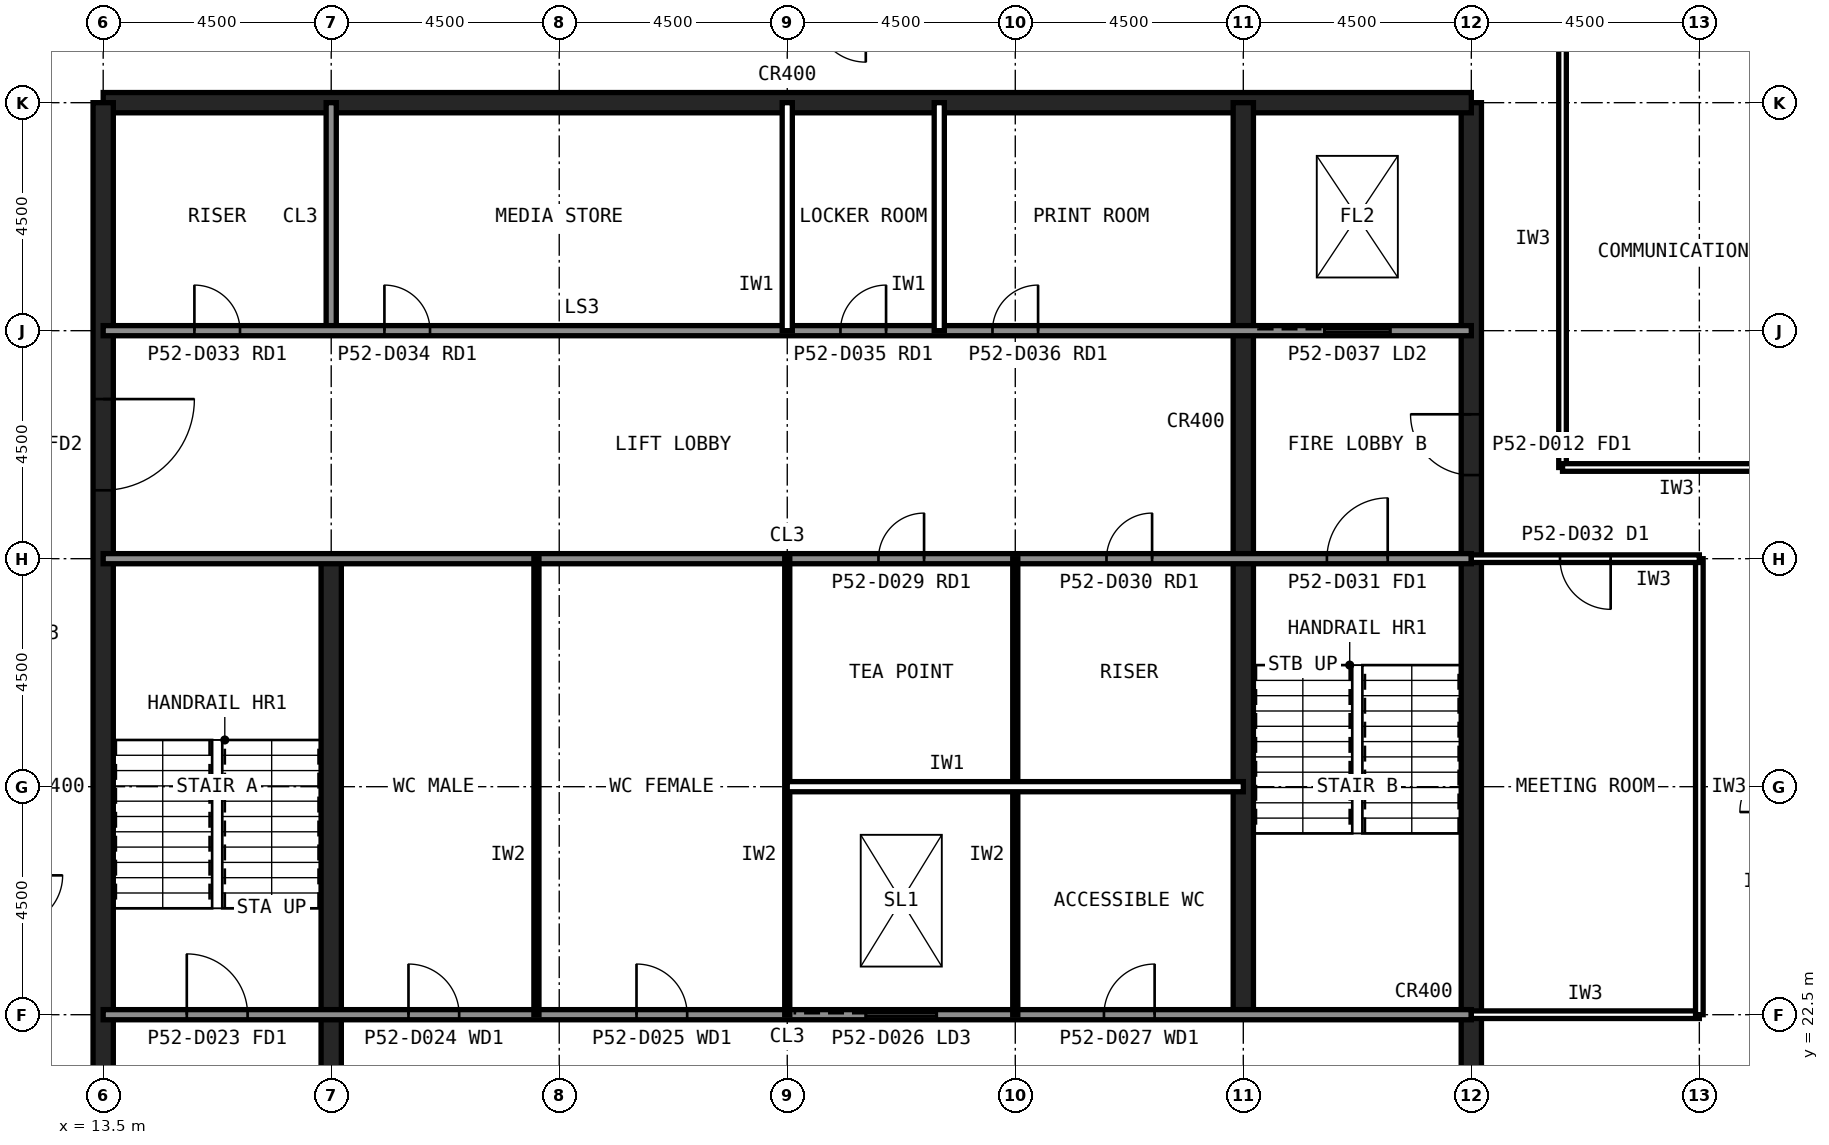
"""IFC4 building model, lengths in metres.
Left out: names, types, materials, properties, quantities, classifications, styles, units other than length and angle.
Written with IfcOpenShell. Run it as: python <this file> out.ifc"""

import sys

from ifc_helpers import new_model, si_unit, direction, frame, frame_2d, origin, place, context, subcontext, project, spatial, rectangle, extrude, element, fill, save


model = new_model("IFC4")
c1 = context("Model", 3, precision=1e-05, world=origin(), true_north=direction((0.0, 1.0)))
c2 = subcontext(c1, "Body", "Model", "MODEL_VIEW")
j1 = project(units=[si_unit("LENGTHUNIT", "METRE"), si_unit("PLANEANGLEUNIT", "RADIAN")], contexts=[c1])
p1 = place(None, origin())
s1 = spatial("IfcSite", under=j1, at=p1, CompositionType="ELEMENT")
p2 = place(p1, origin())
s2 = spatial("IfcBuilding", under=s1, at=p2, CompositionType="ELEMENT")
p3 = place(p2, frame((0.0, 0.0, 222.6)))
s3 = spatial("IfcBuildingStorey", under=s2, at=p3, CompositionType="ELEMENT", Elevation=222.6)
p4 = place(p3, frame((40.5, 13.5, 0.0), z_axis=(0.0, 0.0, 1.0), x_axis=(0.0, 1.0, 0.0)))
e1 = element("IfcWall", 1, at=p4, inside=s3, PredefinedType="SHEAR", context=c2, shape_type="SweptSolid", body=[
    extrude(rectangle(XDim=27.0, YDim=0.4, at=frame_2d((13.5, 0.0))), origin(), (0.0, 0.0, 1.0), 4.0),
])
p5 = place(p4, frame((5.85, 0.0, 0.0)))
e2 = element("IfcOpeningElement", 2, at=p5, cuts=e1, PredefinedType="OPENING", context=c2, shape_type="SweptSolid", body=[
    extrude(rectangle(XDim=1.8, YDim=2.1, at=frame_2d((0.9, 1.05))), frame((0.0, 0.21, 0.0), z_axis=(0.0, -1.0, 0.0), x_axis=(1.0, 0.0, 0.0)), (0.0, 0.0, 1.0), 0.42),
])
p6 = place(p4, frame((19.65, 0.0, 0.0)))
e3 = element("IfcOpeningElement", 3, at=p6, cuts=e1, PredefinedType="OPENING", context=c2, shape_type="SweptSolid", body=[
    extrude(rectangle(XDim=1.2, YDim=2.1, at=frame_2d((0.6, 1.05))), frame((0.0, 0.21, 0.0), z_axis=(0.0, -1.0, 0.0), x_axis=(1.0, 0.0, 0.0)), (0.0, 0.0, 1.0), 0.42),
])
p7 = place(p3, frame((40.5, 40.5, 0.0), z_axis=(0.0, 0.0, 1.0), x_axis=(-1.0, 0.0, 0.0)))
e4 = element("IfcWall", 4, at=p7, inside=s3, PredefinedType="SHEAR", context=c2, shape_type="SweptSolid", body=[
    extrude(rectangle(XDim=27.0, YDim=0.4, at=frame_2d((13.5, 0.0))), origin(), (0.0, 0.0, 1.0), 4.0),
])
p8 = place(p3, frame((13.5, 40.5, 0.0), z_axis=(0.0, 0.0, 1.0), x_axis=(0.0, -1.0, 0.0)))
e5 = element("IfcWall", 5, at=p8, inside=s3, PredefinedType="SHEAR", context=c2, shape_type="SweptSolid", body=[
    extrude(rectangle(XDim=27.0, YDim=0.4, at=frame_2d((13.5, 0.0))), origin(), (0.0, 0.0, 1.0), 4.0),
])
p9 = place(p8, frame((19.65, 0.0, 0.0)))
e6 = element("IfcOpeningElement", 6, at=p9, cuts=e5, PredefinedType="OPENING", context=c2, shape_type="SweptSolid", body=[
    extrude(rectangle(XDim=1.2, YDim=2.1, at=frame_2d((0.6, 1.05))), frame((0.0, 0.21, 0.0), z_axis=(0.0, -1.0, 0.0), x_axis=(1.0, 0.0, 0.0)), (0.0, 0.0, 1.0), 0.42),
])
p10 = place(p8, frame((5.85, 0.0, 0.0)))
e7 = element("IfcOpeningElement", 7, at=p10, cuts=e5, PredefinedType="OPENING", context=c2, shape_type="SweptSolid", body=[
    extrude(rectangle(XDim=1.8, YDim=2.1, at=frame_2d((0.9, 1.05))), frame((0.0, 0.21, 0.0), z_axis=(0.0, -1.0, 0.0), x_axis=(1.0, 0.0, 0.0)), (0.0, 0.0, 1.0), 0.42),
])
p11 = place(p3, frame((18.0, 13.5, 0.0), z_axis=(0.0, 0.0, 1.0), x_axis=(0.0, 1.0, 0.0)))
e8 = element("IfcWall", 8, at=p11, inside=s3, PredefinedType="SHEAR", context=c2, shape_type="SweptSolid", body=[
    extrude(rectangle(XDim=18.0, YDim=0.4, at=frame_2d((9.0, 0.0))), origin(), (0.0, 0.0, 1.0), 4.0),
])
p12 = place(p3, frame((18.0, 36.0, 0.0), z_axis=(0.0, 0.0, 1.0), x_axis=(0.0, 1.0, 0.0)))
e9 = element("IfcWall", 9, at=p12, inside=s3, PredefinedType="SOLIDWALL", context=c2, shape_type="SweptSolid", body=[
    extrude(rectangle(XDim=4.5, YDim=0.2, at=frame_2d((2.25, 0.0))), origin(), (0.0, 0.0, 1.0), 3.84),
])
p13 = place(p3, frame((36.0, 22.5, 0.0), z_axis=(0.0, 0.0, 1.0), x_axis=(0.0, 1.0, 0.0)))
e10 = element("IfcWall", 10, at=p13, inside=s3, PredefinedType="SHEAR", context=c2, shape_type="SweptSolid", body=[
    extrude(rectangle(XDim=18.0, YDim=0.4, at=frame_2d((9.0, 0.0))), origin(), (0.0, 0.0, 1.0), 4.0),
])
p14 = place(p3, frame((13.5, 36.0, 0.0), z_axis=(0.0, 0.0, 1.0), x_axis=(1.0, 0.0, 0.0)))
e11 = element("IfcWall", 11, at=p14, inside=s3, PredefinedType="SOLIDWALL", context=c2, shape_type="SweptSolid", body=[
    extrude(rectangle(XDim=27.0, YDim=0.2, at=frame_2d((13.5, 0.0))), origin(), (0.0, 0.0, 1.0), 3.84),
])
p15 = place(p14, frame((1.8, 0.0, 0.0)))
e12 = element("IfcOpeningElement", 12, at=p15, cuts=e11, PredefinedType="OPENING", context=c2, shape_type="SweptSolid", body=[
    extrude(rectangle(XDim=0.9, YDim=2.1, at=frame_2d((0.45, 1.05))), frame((0.0, 0.11, 0.0), z_axis=(0.0, -1.0, 0.0), x_axis=(1.0, 0.0, 0.0)), (0.0, 0.0, 1.0), 0.22),
])
p16 = place(p14, frame((5.55, 0.0, 0.0)))
e13 = element("IfcOpeningElement", 13, at=p16, cuts=e11, PredefinedType="OPENING", context=c2, shape_type="SweptSolid", body=[
    extrude(rectangle(XDim=0.9, YDim=2.1, at=frame_2d((0.45, 1.05))), frame((0.0, 0.11, 0.0), z_axis=(0.0, -1.0, 0.0), x_axis=(1.0, 0.0, 0.0)), (0.0, 0.0, 1.0), 0.22),
])
p17 = place(p14, frame((14.55, 0.0, 0.0)))
e14 = element("IfcOpeningElement", 14, at=p17, cuts=e11, PredefinedType="OPENING", context=c2, shape_type="SweptSolid", body=[
    extrude(rectangle(XDim=0.9, YDim=2.1, at=frame_2d((0.45, 1.05))), frame((0.0, 0.11, 0.0), z_axis=(0.0, -1.0, 0.0), x_axis=(1.0, 0.0, 0.0)), (0.0, 0.0, 1.0), 0.22),
])
p18 = place(p14, frame((17.55, 0.0, 0.0)))
e15 = element("IfcOpeningElement", 15, at=p18, cuts=e11, PredefinedType="OPENING", context=c2, shape_type="SweptSolid", body=[
    extrude(rectangle(XDim=0.9, YDim=2.1, at=frame_2d((0.45, 1.05))), frame((0.0, 0.11, 0.0), z_axis=(0.0, -1.0, 0.0), x_axis=(1.0, 0.0, 0.0)), (0.0, 0.0, 1.0), 0.22),
])
p19 = place(p14, frame((24.1, 0.0, 0.0)))
e16 = element("IfcOpeningElement", 16, at=p19, cuts=e11, PredefinedType="OPENING", context=c2, shape_type="SweptSolid", body=[
    extrude(rectangle(XDim=1.3, YDim=2.2, at=frame_2d((0.65, 1.1))), frame((0.0, 0.11, 0.0), z_axis=(0.0, -1.0, 0.0), x_axis=(1.0, 0.0, 0.0)), (0.0, 0.0, 1.0), 0.22),
])
p20 = place(p3, frame((13.5, 22.5, 0.0), z_axis=(0.0, 0.0, 1.0), x_axis=(1.0, 0.0, 0.0)))
e17 = element("IfcWall", 17, at=p20, inside=s3, PredefinedType="SOLIDWALL", context=c2, shape_type="SweptSolid", body=[
    extrude(rectangle(XDim=27.0, YDim=0.2, at=frame_2d((13.5, 0.0))), origin(), (0.0, 0.0, 1.0), 3.84),
])
p21 = place(p20, frame((1.65, 0.0, 0.0)))
e18 = element("IfcOpeningElement", 18, at=p21, cuts=e17, PredefinedType="OPENING", context=c2, shape_type="SweptSolid", body=[
    extrude(rectangle(XDim=1.2, YDim=2.1, at=frame_2d((0.6, 1.05))), frame((0.0, 0.11, 0.0), z_axis=(0.0, -1.0, 0.0), x_axis=(1.0, 0.0, 0.0)), (0.0, 0.0, 1.0), 0.22),
])
p22 = place(p20, frame((6.025, 0.0, 0.0)))
e19 = element("IfcOpeningElement", 19, at=p22, cuts=e17, PredefinedType="OPENING", context=c2, shape_type="SweptSolid", body=[
    extrude(rectangle(XDim=1.0, YDim=2.1, at=frame_2d((0.5, 1.05))), frame((0.0, 0.11, 0.0), z_axis=(0.0, -1.0, 0.0), x_axis=(1.0, 0.0, 0.0)), (0.0, 0.0, 1.0), 0.22),
])
p23 = place(p20, frame((10.525, 0.0, 0.0)))
e20 = element("IfcOpeningElement", 20, at=p23, cuts=e17, PredefinedType="OPENING", context=c2, shape_type="SweptSolid", body=[
    extrude(rectangle(XDim=1.0, YDim=2.1, at=frame_2d((0.5, 1.05))), frame((0.0, 0.11, 0.0), z_axis=(0.0, -1.0, 0.0), x_axis=(1.0, 0.0, 0.0)), (0.0, 0.0, 1.0), 0.22),
])
p24 = place(p20, frame((19.75, 0.0, 0.0)))
e21 = element("IfcOpeningElement", 21, at=p24, cuts=e17, PredefinedType="OPENING", context=c2, shape_type="SweptSolid", body=[
    extrude(rectangle(XDim=1.0, YDim=2.1, at=frame_2d((0.5, 1.05))), frame((0.0, 0.11, 0.0), z_axis=(0.0, -1.0, 0.0), x_axis=(1.0, 0.0, 0.0)), (0.0, 0.0, 1.0), 0.22),
])
p25 = place(p20, frame((15.05, 0.0, 0.0)))
e22 = element("IfcOpeningElement", 22, at=p25, cuts=e17, PredefinedType="OPENING", context=c2, shape_type="SweptSolid", body=[
    extrude(rectangle(XDim=1.4, YDim=2.4, at=frame_2d((0.7, 1.2))), frame((0.0, 0.11, 0.0), z_axis=(0.0, -1.0, 0.0), x_axis=(1.0, 0.0, 0.0)), (0.0, 0.0, 1.0), 0.22),
])
p26 = place(p3, frame((13.5, 31.5, 0.0), z_axis=(0.0, 0.0, 1.0), x_axis=(1.0, 0.0, 0.0)))
e23 = element("IfcWall", 23, at=p26, inside=s3, PredefinedType="SOLIDWALL", context=c2, shape_type="SweptSolid", body=[
    extrude(rectangle(XDim=27.0, YDim=0.2, at=frame_2d((13.5, 0.0))), origin(), (0.0, 0.0, 1.0), 3.84),
])
p27 = place(p26, frame((24.15, 0.0, 0.0)))
e24 = element("IfcOpeningElement", 24, at=p27, cuts=e23, PredefinedType="OPENING", context=c2, shape_type="SweptSolid", body=[
    extrude(rectangle(XDim=1.2, YDim=2.1, at=frame_2d((0.6, 1.05))), frame((0.0, 0.11, 0.0), z_axis=(0.0, -1.0, 0.0), x_axis=(1.0, 0.0, 0.0)), (0.0, 0.0, 1.0), 0.22),
])
p28 = place(p26, frame((15.3, 0.0, 0.0)))
e25 = element("IfcOpeningElement", 25, at=p28, cuts=e23, PredefinedType="OPENING", context=c2, shape_type="SweptSolid", body=[
    extrude(rectangle(XDim=0.9, YDim=2.1, at=frame_2d((0.45, 1.05))), frame((0.0, 0.11, 0.0), z_axis=(0.0, -1.0, 0.0), x_axis=(1.0, 0.0, 0.0)), (0.0, 0.0, 1.0), 0.22),
])
p29 = place(p26, frame((19.8, 0.0, 0.0)))
e26 = element("IfcOpeningElement", 26, at=p29, cuts=e23, PredefinedType="OPENING", context=c2, shape_type="SweptSolid", body=[
    extrude(rectangle(XDim=0.9, YDim=2.1, at=frame_2d((0.45, 1.05))), frame((0.0, 0.11, 0.0), z_axis=(0.0, -1.0, 0.0), x_axis=(1.0, 0.0, 0.0)), (0.0, 0.0, 1.0), 0.22),
])
for number, where, z_axis, x_axis in (
    (27, (27.0, 36.0, 0.0), (0.0, 0.0, 1.0), (0.0, 1.0, 0.0)),
    (28, (30.0, 36.0, 0.0), (0.0, 0.0, 1.0), (0.0, 1.0, 0.0)),
):
    element("IfcWall", number, at=place(p3, frame(where, z_axis=z_axis, x_axis=x_axis)), inside=s3, PredefinedType="PARTITIONING", context=c2, shape_type="SweptSolid", body=[
        extrude(rectangle(XDim=4.5, YDim=0.2, at=frame_2d((2.25, 0.0))), origin(), (0.0, 0.0, 1.0), 3.84),
    ])
for number, where, z_axis, x_axis in (
    (29, (22.05, 22.5, 0.0), (0.0, 0.0, 1.0), (0.0, 1.0, 0.0)),
    (30, (27.0, 22.5, 0.0), (0.0, 0.0, 1.0), (0.0, 1.0, 0.0)),
    (31, (31.5, 22.5, 0.0), (0.0, 0.0, 1.0), (0.0, 1.0, 0.0)),
):
    element("IfcWall", number, at=place(p3, frame(where, z_axis=z_axis, x_axis=x_axis)), inside=s3, PredefinedType="PLUMBINGWALL", context=c2, shape_type="SweptSolid", body=[
        extrude(rectangle(XDim=9.0, YDim=0.1, at=frame_2d((4.5, 0.0))), origin(), (0.0, 0.0, 1.0), 3.84),
    ])
p30 = place(p3, frame((27.0, 27.0, 0.0), z_axis=(0.0, 0.0, 1.0), x_axis=(1.0, 0.0, 0.0)))
e32 = element("IfcWall", 32, at=p30, inside=s3, PredefinedType="PARTITIONING", context=c2, shape_type="SweptSolid", body=[
    extrude(rectangle(XDim=9.0, YDim=0.2, at=frame_2d((4.5, 0.0))), origin(), (0.0, 0.0, 1.0), 3.84),
])
p31 = place(p3, frame((42.3, 33.3, 0.0), z_axis=(0.0, 0.0, 1.0), x_axis=(0.0, 1.0, 0.0)))
e33 = element("IfcWall", 33, at=p31, inside=s3, PredefinedType="PARTITIONING", context=c2, shape_type="SweptSolid", body=[
    extrude(rectangle(XDim=9.0, YDim=0.15, at=frame_2d((4.5, 0.0))), origin(), (0.0, 0.0, 1.0), 3.84),
])
p32 = place(p3, frame((46.8, 33.3, 0.0), z_axis=(0.0, 0.0, 1.0), x_axis=(-1.0, 0.0, 0.0)))
e34 = element("IfcWall", 34, at=p32, inside=s3, PredefinedType="PARTITIONING", context=c2, shape_type="SweptSolid", body=[
    extrude(rectangle(XDim=4.5, YDim=0.15, at=frame_2d((2.25, 0.0))), origin(), (0.0, 0.0, 1.0), 3.84),
])
p33 = place(p3, frame((40.5, 22.5, 0.0), z_axis=(0.0, 0.0, 1.0), x_axis=(1.0, 0.0, 0.0)))
e35 = element("IfcWall", 35, at=p33, inside=s3, PredefinedType="PARTITIONING", context=c2, shape_type="SweptSolid", body=[
    extrude(rectangle(XDim=4.5, YDim=0.15, at=frame_2d((2.25, 0.0))), origin(), (0.0, 0.0, 1.0), 2.989),
])
p34 = place(p3, frame((45.0, 22.5, 0.0), z_axis=(0.0, 0.0, 1.0), x_axis=(0.0, 1.0, 0.0)))
e36 = element("IfcWall", 36, at=p34, inside=s3, PredefinedType="PARTITIONING", context=c2, shape_type="SweptSolid", body=[
    extrude(rectangle(XDim=9.0, YDim=0.15, at=frame_2d((4.5, 0.0))), origin(), (0.0, 0.0, 1.0), 3.84),
])
p35 = place(p3, frame((45.0, 31.5, 0.0), z_axis=(0.0, 0.0, 1.0), x_axis=(-1.0, 0.0, 0.0)))
e37 = element("IfcWall", 37, at=p35, inside=s3, PredefinedType="PARTITIONING", context=c2, shape_type="SweptSolid", body=[
    extrude(rectangle(XDim=4.5, YDim=0.15, at=frame_2d((2.25, 0.0))), origin(), (0.0, 0.0, 1.0), 2.989),
])
p36 = place(p35, frame((1.75, 0.0, 0.0)))
e38 = element("IfcOpeningElement", 38, at=p36, cuts=e37, PredefinedType="OPENING", context=c2, shape_type="SweptSolid", body=[
    extrude(rectangle(XDim=1.0, YDim=2.1, at=frame_2d((0.5, 1.05))), frame((0.0, 0.085, 0.0), z_axis=(0.0, -1.0, 0.0), x_axis=(1.0, 0.0, 0.0)), (0.0, 0.0, 1.0), 0.17),
])
p37 = place(p10, origin())
e39 = element("IfcDoor", 39, at=p37, inside=s3, OperationType="SINGLE_SWING_LEFT", PredefinedType="DOOR", context=c2, shape_type="SweptSolid", body=[
    extrude(rectangle(XDim=1.8, YDim=2.1, at=frame_2d((0.9, 1.05))), frame((0.0, 0.025, 0.0), z_axis=(0.0, -1.0, 0.0), x_axis=(1.0, 0.0, 0.0)), (0.0, 0.0, 1.0), 0.05),
])
fill(e7, e39)
p38 = place(p6, origin())
e40 = element("IfcDoor", 40, at=p38, inside=s3, OperationType="SINGLE_SWING_RIGHT", PredefinedType="DOOR", context=c2, shape_type="SweptSolid", body=[
    extrude(rectangle(XDim=1.2, YDim=2.1, at=frame_2d((0.6, 1.05))), frame((0.0, 0.025, 0.0), z_axis=(0.0, -1.0, 0.0), x_axis=(1.0, 0.0, 0.0)), (0.0, 0.0, 1.0), 0.05),
])
fill(e3, e40)
p39 = place(p21, origin())
e41 = element("IfcDoor", 41, at=p39, inside=s3, OperationType="SINGLE_SWING_LEFT", PredefinedType="DOOR", context=c2, shape_type="SweptSolid", body=[
    extrude(rectangle(XDim=1.2, YDim=2.1, at=frame_2d((0.6, 1.05))), frame((0.0, 0.025, 0.0), z_axis=(0.0, -1.0, 0.0), x_axis=(1.0, 0.0, 0.0)), (0.0, 0.0, 1.0), 0.05),
])
fill(e18, e41)
p40 = place(p27, origin())
e42 = element("IfcDoor", 42, at=p40, inside=s3, OperationType="SINGLE_SWING_RIGHT", PredefinedType="DOOR", context=c2, shape_type="SweptSolid", body=[
    extrude(rectangle(XDim=1.2, YDim=2.1, at=frame_2d((0.6, 1.05))), frame((0.0, 0.025, 0.0), z_axis=(0.0, -1.0, 0.0), x_axis=(1.0, 0.0, 0.0)), (0.0, 0.0, 1.0), 0.05),
])
fill(e24, e42)
p41 = place(p22, origin())
e43 = element("IfcDoor", 43, at=p41, inside=s3, OperationType="SINGLE_SWING_LEFT", PredefinedType="DOOR", context=c2, shape_type="SweptSolid", body=[
    extrude(rectangle(XDim=1.0, YDim=2.1, at=frame_2d((0.5, 1.05))), frame((0.0, 0.025, 0.0), z_axis=(0.0, -1.0, 0.0), x_axis=(1.0, 0.0, 0.0)), (0.0, 0.0, 1.0), 0.05),
])
fill(e19, e43)
p42 = place(p23, origin())
e44 = element("IfcDoor", 44, at=p42, inside=s3, OperationType="SINGLE_SWING_LEFT", PredefinedType="DOOR", context=c2, shape_type="SweptSolid", body=[
    extrude(rectangle(XDim=1.0, YDim=2.1, at=frame_2d((0.5, 1.05))), frame((0.0, 0.025, 0.0), z_axis=(0.0, -1.0, 0.0), x_axis=(1.0, 0.0, 0.0)), (0.0, 0.0, 1.0), 0.05),
])
fill(e20, e44)
p43 = place(p24, origin())
e45 = element("IfcDoor", 45, at=p43, inside=s3, OperationType="SINGLE_SWING_RIGHT", PredefinedType="DOOR", context=c2, shape_type="SweptSolid", body=[
    extrude(rectangle(XDim=1.0, YDim=2.1, at=frame_2d((0.5, 1.05))), frame((0.0, 0.025, 0.0), z_axis=(0.0, -1.0, 0.0), x_axis=(1.0, 0.0, 0.0)), (0.0, 0.0, 1.0), 0.05),
])
fill(e21, e45)
p44 = place(p28, origin())
e46 = element("IfcDoor", 46, at=p44, inside=s3, OperationType="SINGLE_SWING_RIGHT", PredefinedType="DOOR", context=c2, shape_type="SweptSolid", body=[
    extrude(rectangle(XDim=0.9, YDim=2.1, at=frame_2d((0.45, 1.05))), frame((0.0, 0.025, 0.0), z_axis=(0.0, -1.0, 0.0), x_axis=(1.0, 0.0, 0.0)), (0.0, 0.0, 1.0), 0.05),
])
fill(e25, e46)
p45 = place(p29, origin())
e47 = element("IfcDoor", 47, at=p45, inside=s3, OperationType="SINGLE_SWING_RIGHT", PredefinedType="DOOR", context=c2, shape_type="SweptSolid", body=[
    extrude(rectangle(XDim=0.9, YDim=2.1, at=frame_2d((0.45, 1.05))), frame((0.0, 0.025, 0.0), z_axis=(0.0, -1.0, 0.0), x_axis=(1.0, 0.0, 0.0)), (0.0, 0.0, 1.0), 0.05),
])
fill(e26, e47)
p46 = place(p15, origin())
e48 = element("IfcDoor", 48, at=p46, inside=s3, OperationType="SINGLE_SWING_LEFT", PredefinedType="DOOR", context=c2, shape_type="SweptSolid", body=[
    extrude(rectangle(XDim=0.9, YDim=2.1, at=frame_2d((0.45, 1.05))), frame((0.0, 0.025, 0.0), z_axis=(0.0, -1.0, 0.0), x_axis=(1.0, 0.0, 0.0)), (0.0, 0.0, 1.0), 0.05),
])
fill(e12, e48)
p47 = place(p16, origin())
e49 = element("IfcDoor", 49, at=p47, inside=s3, OperationType="SINGLE_SWING_LEFT", PredefinedType="DOOR", context=c2, shape_type="SweptSolid", body=[
    extrude(rectangle(XDim=0.9, YDim=2.1, at=frame_2d((0.45, 1.05))), frame((0.0, 0.025, 0.0), z_axis=(0.0, -1.0, 0.0), x_axis=(1.0, 0.0, 0.0)), (0.0, 0.0, 1.0), 0.05),
])
fill(e13, e49)
p48 = place(p17, origin())
e50 = element("IfcDoor", 50, at=p48, inside=s3, OperationType="SINGLE_SWING_RIGHT", PredefinedType="DOOR", context=c2, shape_type="SweptSolid", body=[
    extrude(rectangle(XDim=0.9, YDim=2.1, at=frame_2d((0.45, 1.05))), frame((0.0, 0.025, 0.0), z_axis=(0.0, -1.0, 0.0), x_axis=(1.0, 0.0, 0.0)), (0.0, 0.0, 1.0), 0.05),
])
fill(e14, e50)
p49 = place(p18, origin())
e51 = element("IfcDoor", 51, at=p49, inside=s3, OperationType="SINGLE_SWING_RIGHT", PredefinedType="DOOR", context=c2, shape_type="SweptSolid", body=[
    extrude(rectangle(XDim=0.9, YDim=2.1, at=frame_2d((0.45, 1.05))), frame((0.0, 0.025, 0.0), z_axis=(0.0, -1.0, 0.0), x_axis=(1.0, 0.0, 0.0)), (0.0, 0.0, 1.0), 0.05),
])
fill(e15, e51)
p50 = place(p19, origin())
e52 = element("IfcDoor", 52, at=p50, inside=s3, OperationType="SLIDING_TO_LEFT", PredefinedType="DOOR", context=c2, shape_type="SweptSolid", body=[
    extrude(rectangle(XDim=1.3, YDim=2.2, at=frame_2d((0.65, 1.1))), frame((0.0, 0.025, 0.0), z_axis=(0.0, -1.0, 0.0), x_axis=(1.0, 0.0, 0.0)), (0.0, 0.0, 1.0), 0.05),
])
fill(e16, e52)
p51 = place(p25, origin())
e53 = element("IfcDoor", 53, at=p51, inside=s3, OperationType="SLIDING_TO_LEFT", PredefinedType="DOOR", context=c2, shape_type="SweptSolid", body=[
    extrude(rectangle(XDim=1.4, YDim=2.4, at=frame_2d((0.7, 1.2))), frame((0.0, 0.025, 0.0), z_axis=(0.0, -1.0, 0.0), x_axis=(1.0, 0.0, 0.0)), (0.0, 0.0, 1.0), 0.05),
])
fill(e22, e53)
p52 = place(p36, origin())
e54 = element("IfcDoor", 54, at=p52, inside=s3, OperationType="SINGLE_SWING_LEFT", PredefinedType="DOOR", context=c2, shape_type="SweptSolid", body=[
    extrude(rectangle(XDim=1.0, YDim=2.1, at=frame_2d((0.5, 1.05))), frame((0.0, 0.025, 0.0), z_axis=(0.0, -1.0, 0.0), x_axis=(1.0, 0.0, 0.0)), (0.0, 0.0, 1.0), 0.05),
])
fill(e38, e54)
save(model, sys.argv[1])
